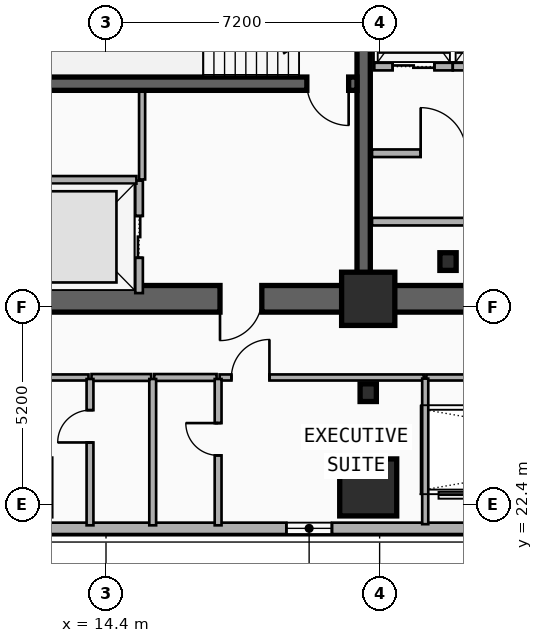
"""IFC4 building model, lengths in metres.
Left out: names, types, materials, properties, quantities, classifications, styles, units other than length and angle.
Written with IfcOpenShell. Run it as: python <this file> out.ifc"""

import sys

from ifc_helpers import new_model, si_unit, direction, frame, frame_2d, origin, origin_2d, place, context, subcontext, project, spatial, rectangle, i_section, extrude, element, fill, save


model = new_model("IFC4")
c1 = context("Model", 3, precision=1e-05, world=origin(), true_north=direction((0.0, 1.0)))
c2 = subcontext(c1, "Body", "Model", "MODEL_VIEW")
j1 = project(units=[si_unit("LENGTHUNIT", "METRE"), si_unit("PLANEANGLEUNIT", "RADIAN")], contexts=[c1])
p1 = place(None, origin())
s1 = spatial("IfcSite", under=j1, at=p1, CompositionType="ELEMENT")
p2 = place(p1, origin())
s2 = spatial("IfcBuilding", under=s1, at=p2, CompositionType="ELEMENT")
p3 = place(p2, frame((0.0, 0.0, 36.0)))
s3 = spatial("IfcBuildingStorey", under=s2, at=p3, CompositionType="ELEMENT", Elevation=36.0)
p4 = place(p3, frame((21.18, 27.82, 0.0), z_axis=(0.0, 0.0, 1.0), x_axis=(-1.0, 0.0, 0.0)))
e1 = element("IfcWall", 1, at=p4, inside=s3, PredefinedType="SHEAR", context=c2, shape_type="SweptSolid", body=[
    extrude(rectangle(XDim=9.03, YDim=0.7, at=frame_2d((4.515, 0.0))), origin(), (0.0, 0.0, 1.0), 3.5),
])
p5 = place(p4, frame((2.68, 0.0, 0.0)))
e2 = element("IfcOpeningElement", 2, at=p5, cuts=e1, PredefinedType="OPENING", context=c2, shape_type="SweptSolid", body=[
    extrude(rectangle(XDim=1.1, YDim=2.15, at=frame_2d((0.55, 1.075))), frame((0.0, 0.36, 0.0), z_axis=(0.0, -1.0, 0.0), x_axis=(1.0, 0.0, 0.0)), (0.0, 0.0, 1.0), 0.72),
])
p6 = place(p3, frame((33.15, 27.82, 0.0), z_axis=(0.0, 0.0, 1.0), x_axis=(-1.0, 0.0, 0.0)))
e3 = element("IfcWall", 3, at=p6, inside=s3, PredefinedType="SHEAR", context=c2, shape_type="SweptSolid", body=[
    extrude(rectangle(XDim=11.97, YDim=0.7, at=frame_2d((5.985, 0.0))), origin(), (0.0, 0.0, 1.0), 3.5),
])
p7 = place(p6, frame((6.1, 0.0, 0.0)))
e4 = element("IfcOpeningElement", 4, at=p7, cuts=e3, PredefinedType="OPENING", context=c2, shape_type="SweptSolid", body=[
    extrude(rectangle(XDim=1.6, YDim=2.2, at=frame_2d((0.8, 1.1))), frame((0.0, 0.36, 0.0), z_axis=(0.0, -1.0, 0.0), x_axis=(1.0, 0.0, 0.0)), (0.0, 0.0, 1.0), 0.72),
])
p8 = place(p3, frame((21.18, 28.17, 0.0), z_axis=(0.0, 0.0, 1.0), x_axis=(0.0, 1.0, 0.0)))
e5 = element("IfcWall", 5, at=p8, inside=s3, PredefinedType="SHEAR", context=c2, shape_type="SweptSolid", body=[
    extrude(rectangle(XDim=8.53, YDim=0.35, at=frame_2d((4.265, 0.0))), origin(), (0.0, 0.0, 1.0), 3.5),
])
p9 = place(p3, frame((21.005, 33.48, 0.0), z_axis=(0.0, 0.0, 1.0), x_axis=(-1.0, 0.0, 0.0)))
e6 = element("IfcWall", 6, at=p9, inside=s3, PredefinedType="SHEAR", context=c2, shape_type="SweptSolid", body=[
    extrude(rectangle(XDim=8.505, YDim=0.35, at=frame_2d((4.252, 0.0))), origin(), (0.0, 0.0, 1.0), 3.5),
])
p10 = place(p9, frame((0.22, 0.0, 0.0)))
e7 = element("IfcOpeningElement", 7, at=p10, cuts=e6, PredefinedType="OPENING", context=c2, shape_type="SweptSolid", body=[
    extrude(rectangle(XDim=1.1, YDim=2.15, at=frame_2d((0.55, 1.075))), frame((0.0, 0.185, 0.0), z_axis=(0.0, -1.0, 0.0), x_axis=(1.0, 0.0, 0.0)), (0.0, 0.0, 1.0), 0.37),
])
p11 = place(p3, frame((23.4, 28.8, 0.0), z_axis=(0.0, 0.0, 1.0), x_axis=(1.0, 0.0, 0.0)))
e8 = element("IfcColumn", 8, at=p11, inside=s3, PredefinedType="COLUMN", context=c2, shape_type="SweptSolid", body=[
    extrude(i_section(OverallWidth=0.428, OverallDepth=0.465, WebThickness=0.045, FlangeThickness=0.073, FilletRadius=0.015, at=origin_2d()), origin(), (0.0, 0.0, 1.0), 3.5),
])
p12 = place(p3, frame((21.3, 27.82, 0.0), z_axis=(0.0, 0.0, 1.0), x_axis=(1.0, 0.0, 0.0)))
e9 = element("IfcColumn", 9, at=p12, inside=s3, PredefinedType="COLUMN", context=c2, shape_type="SweptSolid", body=[
    extrude(rectangle(XDim=1.4, YDim=1.4, at=origin_2d()), origin(), (0.0, 0.0, 1.0), 3.5),
])
p13 = place(p3, frame((21.3, 25.35, 0.0), z_axis=(0.0, 0.0, 1.0), x_axis=(1.0, 0.0, 0.0)))
e10 = element("IfcColumn", 10, at=p13, inside=s3, PredefinedType="COLUMN", context=c2, shape_type="SweptSolid", body=[
    extrude(i_section(OverallWidth=0.428, OverallDepth=0.465, WebThickness=0.045, FlangeThickness=0.073, FilletRadius=0.015, at=origin_2d()), origin(), (0.0, 0.0, 1.0), 3.5),
])
p14 = place(p3, frame((21.3, 22.966, 0.0), z_axis=(0.0, -0.090310252801, 0.995913680114), x_axis=(1.0, 0.0, 0.0)))
e11 = element("IfcColumn", 11, at=p14, inside=s3, PredefinedType="COLUMN", context=c2, shape_type="SweptSolid", body=[
    extrude(rectangle(XDim=1.5, YDim=1.5, at=origin_2d()), origin(), (0.0, 0.0, 1.0), 3.514),
])
p15 = place(p3, frame((53.4, 21.78, 0.0), z_axis=(0.0, 0.0, 1.0), x_axis=(-1.0, 0.0, 0.0)))
e12 = element("IfcWall", 12, at=p15, inside=s3, PredefinedType="SOLIDWALL", context=c2, shape_type="SweptSolid", body=[
    extrude(rectangle(XDim=49.2, YDim=0.3, at=frame_2d((24.6, 0.0))), origin(), (0.0, 0.0, 1.0), 3.24),
])
p16 = place(p15, frame((46.915, 0.0, 0.65)))
e13 = element("IfcOpeningElement", 13, at=p16, cuts=e12, PredefinedType="OPENING", context=c2, shape_type="SweptSolid", body=[
    extrude(rectangle(XDim=1.8, YDim=1.8, at=frame_2d((0.9, 0.9))), frame((0.0, 0.16, 0.0), z_axis=(0.0, -1.0, 0.0), x_axis=(1.0, 0.0, 0.0)), (0.0, 0.0, 1.0), 0.32),
])
p17 = place(p15, frame((42.227, 0.0, 0.65)))
e14 = element("IfcOpeningElement", 14, at=p17, cuts=e12, PredefinedType="OPENING", context=c2, shape_type="SweptSolid", body=[
    extrude(rectangle(XDim=1.8, YDim=1.8, at=frame_2d((0.9, 0.9))), frame((0.0, 0.16, 0.0), z_axis=(0.0, -1.0, 0.0), x_axis=(1.0, 0.0, 0.0)), (0.0, 0.0, 1.0), 0.32),
])
p18 = place(p15, frame((33.055, 0.0, 0.48)))
e15 = element("IfcOpeningElement", 15, at=p18, cuts=e12, PredefinedType="OPENING", context=c2, shape_type="SweptSolid", body=[
    extrude(rectangle(XDim=1.2, YDim=1.5, at=frame_2d((0.6, 0.75))), frame((0.0, 0.16, 0.0), z_axis=(0.0, -1.0, 0.0), x_axis=(1.0, 0.0, 0.0)), (0.0, 0.0, 1.0), 0.32),
])
p19 = place(p15, frame((14.995, 0.0, 1.22)))
e16 = element("IfcOpeningElement", 16, at=p19, cuts=e12, PredefinedType="OPENING", context=c2, shape_type="SweptSolid", body=[
    extrude(rectangle(XDim=1.1, YDim=1.05, at=frame_2d((0.55, 0.525))), frame((0.0, 0.16, 0.0), z_axis=(0.0, -1.0, 0.0), x_axis=(1.0, 0.0, 0.0)), (0.0, 0.0, 1.0), 0.32),
])
p20 = place(p15, frame((5.173, 0.0, 0.65)))
e17 = element("IfcOpeningElement", 17, at=p20, cuts=e12, PredefinedType="OPENING", context=c2, shape_type="SweptSolid", body=[
    extrude(rectangle(XDim=1.8, YDim=1.8, at=frame_2d((0.9, 0.9))), frame((0.0, 0.16, 0.0), z_axis=(0.0, -1.0, 0.0), x_axis=(1.0, 0.0, 0.0)), (0.0, 0.0, 1.0), 0.32),
])
p21 = place(p15, frame((0.485, 0.0, 0.65)))
e18 = element("IfcOpeningElement", 18, at=p21, cuts=e12, PredefinedType="OPENING", context=c2, shape_type="SweptSolid", body=[
    extrude(rectangle(XDim=1.8, YDim=1.8, at=frame_2d((0.9, 0.9))), frame((0.0, 0.16, 0.0), z_axis=(0.0, -1.0, 0.0), x_axis=(1.0, 0.0, 0.0)), (0.0, 0.0, 1.0), 0.32),
])
p22 = place(p3, frame((15.27, 27.97, 0.0), z_axis=(0.0, 0.0, 1.0), x_axis=(0.0, 1.0, 0.0)))
e19 = element("IfcWall", 19, at=p22, inside=s3, PredefinedType="PARTITIONING", context=c2, shape_type="SweptSolid", body=[
    extrude(rectangle(XDim=2.96, YDim=0.2, at=frame_2d((1.48, 0.0))), origin(), (0.0, 0.0, 1.0), 2.212),
])
p23 = place(p22, frame((0.93, 0.0, 0.0)))
e20 = element("IfcOpeningElement", 20, at=p23, cuts=e19, PredefinedType="OPENING", context=c2, shape_type="SweptSolid", body=[
    extrude(rectangle(XDim=1.1, YDim=2.15, at=frame_2d((0.55, 1.075))), frame((0.0, 0.11, 0.0), z_axis=(0.0, -1.0, 0.0), x_axis=(1.0, 0.0, 0.0)), (0.0, 0.0, 1.0), 0.22),
])
p24 = place(p3, frame((12.45, 30.95, 0.0), z_axis=(0.0, 0.0, 1.0), x_axis=(1.0, 0.0, 0.0)))
e21 = element("IfcWall", 21, at=p24, inside=s3, PredefinedType="PARTITIONING", context=c2, shape_type="SweptSolid", body=[
    extrude(rectangle(XDim=2.75, YDim=0.2, at=frame_2d((1.375, 0.0))), origin(), (0.0, 0.0, 1.0), 2.212),
])
p25 = place(p3, frame((21.46, 33.93, 0.0), z_axis=(0.0, 0.0, 1.0), x_axis=(1.0, 0.0, 0.0)))
e22 = element("IfcWall", 22, at=p25, inside=s3, PredefinedType="PARTITIONING", context=c2, shape_type="SweptSolid", body=[
    extrude(rectangle(XDim=2.065, YDim=0.2, at=frame_2d((1.032, 0.0))), origin(), (0.0, 0.0, 1.0), 2.212),
])
p26 = place(p25, frame((0.482, 0.0, 0.0)))
e23 = element("IfcOpeningElement", 23, at=p26, cuts=e22, PredefinedType="OPENING", context=c2, shape_type="SweptSolid", body=[
    extrude(rectangle(XDim=1.1, YDim=2.15, at=frame_2d((0.55, 1.075))), frame((0.0, 0.11, 0.0), z_axis=(0.0, -1.0, 0.0), x_axis=(1.0, 0.0, 0.0)), (0.0, 0.0, 1.0), 0.22),
])
p27 = place(p3, frame((23.525, 33.93, 0.0), z_axis=(0.0, 0.0, 1.0), x_axis=(1.0, 0.0, 0.0)))
e24 = element("IfcWall", 24, at=p27, inside=s3, PredefinedType="PARTITIONING", context=c2, shape_type="SweptSolid", body=[
    extrude(rectangle(XDim=2.05, YDim=0.2, at=frame_2d((1.025, 0.0))), origin(), (0.0, 0.0, 1.0), 3.24),
])
p28 = place(p27, frame((0.475, 0.0, 0.0)))
e25 = element("IfcOpeningElement", 25, at=p28, cuts=e24, PredefinedType="OPENING", context=c2, shape_type="SweptSolid", body=[
    extrude(rectangle(XDim=1.1, YDim=2.15, at=frame_2d((0.55, 1.075))), frame((0.0, 0.11, 0.0), z_axis=(0.0, -1.0, 0.0), x_axis=(1.0, 0.0, 0.0)), (0.0, 0.0, 1.0), 0.22),
])
p29 = place(p3, frame((21.4, 31.65, 0.0), z_axis=(0.0, 0.0, 1.0), x_axis=(1.0, 0.0, 0.0)))
e26 = element("IfcWall", 26, at=p29, inside=s3, PredefinedType="PARTITIONING", context=c2, shape_type="SweptSolid", body=[
    extrude(rectangle(XDim=3.76, YDim=0.2, at=frame_2d((1.88, 0.0))), origin(), (0.0, 0.0, 1.0), 2.28),
])
p30 = place(p29, frame((1.28, 0.0, 0.0)))
e27 = element("IfcOpeningElement", 27, at=p30, cuts=e26, PredefinedType="OPENING", context=c2, shape_type="SweptSolid", body=[
    extrude(rectangle(XDim=1.2, YDim=2.15, at=frame_2d((0.6, 1.075))), frame((0.0, 0.11, 0.0), z_axis=(0.0, -1.0, 0.0), x_axis=(1.0, 0.0, 0.0)), (0.0, 0.0, 1.0), 0.22),
])
p31 = place(p3, frame((21.4, 29.85, 0.0), z_axis=(0.0, 0.0, 1.0), x_axis=(1.0, 0.0, 0.0)))
e28 = element("IfcWall", 28, at=p31, inside=s3, PredefinedType="PARTITIONING", context=c2, shape_type="SweptSolid", body=[
    extrude(rectangle(XDim=3.76, YDim=0.2, at=frame_2d((1.88, 0.0))), origin(), (0.0, 0.0, 1.0), 2.28),
])
p32 = place(p3, frame((9.04, 25.75, 0.0), z_axis=(0.0, 0.0, 1.0), x_axis=(1.0, 0.0, 0.0)))
e29 = element("IfcWall", 29, at=p32, inside=s3, PredefinedType="PARTITIONING", context=c2, shape_type="SweptSolid", body=[
    extrude(rectangle(XDim=4.899, YDim=0.16, at=frame_2d((2.449, 0.0))), origin(), (0.0, 0.0, 1.0), 2.28),
])
p33 = place(p32, frame((0.291, 0.0, 0.0)))
e30 = element("IfcOpeningElement", 30, at=p33, cuts=e29, PredefinedType="OPENING", context=c2, shape_type="SweptSolid", body=[
    extrude(rectangle(XDim=1.0, YDim=2.15, at=frame_2d((0.5, 1.075))), frame((0.0, 0.09, 0.0), z_axis=(0.0, -1.0, 0.0), x_axis=(1.0, 0.0, 0.0)), (0.0, 0.0, 1.0), 0.18),
])
p34 = place(p3, frame((14.019, 25.75, 0.0), z_axis=(0.0, 0.0, 1.0), x_axis=(1.0, 0.0, 0.0)))
e31 = element("IfcWall", 31, at=p34, inside=s3, PredefinedType="PLUMBINGWALL", context=c2, shape_type="SweptSolid", body=[
    extrude(rectangle(XDim=1.57, YDim=0.18, at=frame_2d((0.785, 0.0))), origin(), (0.0, 0.0, 1.0), 3.24),
])
p35 = place(p3, frame((17.39, 25.75, 0.0), z_axis=(0.0, 0.0, 1.0), x_axis=(1.0, 0.0, 0.0)))
e32 = element("IfcWall", 32, at=p35, inside=s3, PredefinedType="PARTITIONING", context=c2, shape_type="SweptSolid", body=[
    extrude(rectangle(XDim=5.37, YDim=0.16, at=frame_2d((2.685, 0.0))), origin(), (0.0, 0.0, 1.0), 2.28),
])
p36 = place(p35, frame((0.31, 0.0, 0.0)))
e33 = element("IfcOpeningElement", 33, at=p36, cuts=e32, PredefinedType="OPENING", context=c2, shape_type="SweptSolid", body=[
    extrude(rectangle(XDim=1.0, YDim=2.15, at=frame_2d((0.5, 1.075))), frame((0.0, 0.09, 0.0), z_axis=(0.0, -1.0, 0.0), x_axis=(1.0, 0.0, 0.0)), (0.0, 0.0, 1.0), 0.18),
])
p37 = place(p3, frame((15.669, 25.75, 0.0), z_axis=(0.0, 0.0, 1.0), x_axis=(1.0, 0.0, 0.0)))
e34 = element("IfcWall", 34, at=p37, inside=s3, PredefinedType="PLUMBINGWALL", context=c2, shape_type="SweptSolid", body=[
    extrude(rectangle(XDim=1.641, YDim=0.18, at=frame_2d((0.821, 0.0))), origin(), (0.0, 0.0, 1.0), 3.24),
])
p38 = place(p3, frame((13.979, 21.86, 0.0), z_axis=(0.0, 0.0, 1.0), x_axis=(0.0, 1.0, 0.0)))
e35 = element("IfcWall", 35, at=p38, inside=s3, PredefinedType="PLUMBINGWALL", context=c2, shape_type="SweptSolid", body=[
    extrude(rectangle(XDim=3.85, YDim=0.18, at=frame_2d((1.925, 0.0))), origin(), (0.0, 0.0, 1.0), 2.82),
])
p39 = place(p38, frame((2.18, 0.0, 0.0)))
e36 = element("IfcOpeningElement", 36, at=p39, cuts=e35, PredefinedType="OPENING", context=c2, shape_type="SweptSolid", body=[
    extrude(rectangle(XDim=0.85, YDim=2.1, at=frame_2d((0.425, 1.05))), frame((0.0, 0.1, 0.0), z_axis=(0.0, -1.0, 0.0), x_axis=(1.0, 0.0, 0.0)), (0.0, 0.0, 1.0), 0.2),
])
p40 = place(p3, frame((15.629, 21.86, 0.0), z_axis=(0.0, 0.0, 1.0), x_axis=(0.0, 1.0, 0.0)))
e37 = element("IfcWall", 37, at=p40, inside=s3, PredefinedType="PLUMBINGWALL", context=c2, shape_type="SweptSolid", body=[
    extrude(rectangle(XDim=3.85, YDim=0.18, at=frame_2d((1.925, 0.0))), origin(), (0.0, 0.0, 1.0), 2.82),
])
p41 = place(p3, frame((17.35, 21.86, 0.0), z_axis=(0.0, 0.0, 1.0), x_axis=(0.0, 1.0, 0.0)))
e38 = element("IfcWall", 38, at=p41, inside=s3, PredefinedType="PLUMBINGWALL", context=c2, shape_type="SweptSolid", body=[
    extrude(rectangle(XDim=3.85, YDim=0.18, at=frame_2d((1.925, 0.0))), origin(), (0.0, 0.0, 1.0), 2.82),
])
p42 = place(p41, frame((1.84, 0.0, 0.0)))
e39 = element("IfcOpeningElement", 39, at=p42, cuts=e38, PredefinedType="OPENING", context=c2, shape_type="SweptSolid", body=[
    extrude(rectangle(XDim=0.85, YDim=2.1, at=frame_2d((0.425, 1.05))), frame((0.0, 0.1, 0.0), z_axis=(0.0, -1.0, 0.0), x_axis=(1.0, 0.0, 0.0)), (0.0, 0.0, 1.0), 0.2),
])
p43 = place(p3, frame((15.35, 30.96, 0.0), z_axis=(0.0, 0.0, 1.0), x_axis=(0.0, 1.0, 0.0)))
e40 = element("IfcWall", 40, at=p43, inside=s3, PredefinedType="PARTITIONING", context=c2, shape_type="SweptSolid", body=[
    extrude(rectangle(XDim=2.31, YDim=0.16, at=frame_2d((1.155, 0.0))), origin(), (0.0, 0.0, 1.0), 3.24),
])
p44 = place(p3, frame((22.83, 25.75, 0.0), z_axis=(0.0, 0.0, 1.0), x_axis=(1.0, 0.0, 0.0)))
e41 = element("IfcWall", 41, at=p44, inside=s3, PredefinedType="PARTITIONING", context=c2, shape_type="SweptSolid", body=[
    extrude(rectangle(XDim=11.94, YDim=0.16, at=frame_2d((5.97, 0.0))), origin(), (0.0, 0.0, 1.0), 3.24),
])
p45 = place(p3, frame((22.8, 21.89, 0.0), z_axis=(0.0, 0.0, 1.0), x_axis=(0.0, 1.0, 0.0)))
e42 = element("IfcWall", 42, at=p45, inside=s3, PredefinedType="PARTITIONING", context=c2, shape_type="SweptSolid", body=[
    extrude(rectangle(XDim=3.83, YDim=0.16, at=frame_2d((1.915, 0.0))), origin(), (0.0, 0.0, 1.0), 2.82),
])
p46 = place(p18, origin())
e43 = element("IfcWindow", 43, at=p46, inside=s3, PartitioningType="SINGLE_PANEL", PredefinedType="WINDOW", context=c2, shape_type="SweptSolid", body=[
    extrude(rectangle(XDim=1.2, YDim=1.5, at=frame_2d((0.6, 0.75))), frame((0.0, 0.03, 0.0), z_axis=(0.0, -1.0, 0.0), x_axis=(1.0, 0.0, 0.0)), (0.0, 0.0, 1.0), 0.06),
])
fill(e15, e43)
p47 = place(p23, origin())
e44 = element("IfcDoor", 44, at=p47, inside=s3, OperationType="DOUBLE_DOOR_SLIDING", PredefinedType="DOOR", context=c2, shape_type="SweptSolid", body=[
    extrude(rectangle(XDim=1.1, YDim=2.15, at=frame_2d((0.55, 1.075))), frame((0.0, 0.025, 0.0), z_axis=(0.0, -1.0, 0.0), x_axis=(1.0, 0.0, 0.0)), (0.0, 0.0, 1.0), 0.05),
])
fill(e20, e44)
p48 = place(p26, origin())
e45 = element("IfcDoor", 45, at=p48, inside=s3, OperationType="DOUBLE_DOOR_SLIDING", PredefinedType="DOOR", context=c2, shape_type="SweptSolid", body=[
    extrude(rectangle(XDim=1.1, YDim=2.15, at=frame_2d((0.55, 1.075))), frame((0.0, 0.025, 0.0), z_axis=(0.0, -1.0, 0.0), x_axis=(1.0, 0.0, 0.0)), (0.0, 0.0, 1.0), 0.05),
])
fill(e23, e45)
p49 = place(p10, origin())
e46 = element("IfcDoor", 46, at=p49, inside=s3, OperationType="SINGLE_SWING_LEFT", PredefinedType="DOOR", context=c2, shape_type="SweptSolid", body=[
    extrude(rectangle(XDim=1.1, YDim=2.15, at=frame_2d((0.55, 1.075))), frame((0.0, 0.025, 0.0), z_axis=(0.0, -1.0, 0.0), x_axis=(1.0, 0.0, 0.0)), (0.0, 0.0, 1.0), 0.05),
])
fill(e7, e46)
p50 = place(p5, origin())
e47 = element("IfcDoor", 47, at=p50, inside=s3, OperationType="SINGLE_SWING_RIGHT", PredefinedType="DOOR", context=c2, shape_type="SweptSolid", body=[
    extrude(rectangle(XDim=1.1, YDim=2.15, at=frame_2d((0.55, 1.075))), frame((0.0, 0.025, 0.0), z_axis=(0.0, -1.0, 0.0), x_axis=(1.0, 0.0, 0.0)), (0.0, 0.0, 1.0), 0.05),
])
fill(e2, e47)
p51 = place(p30, origin())
e48 = element("IfcDoor", 48, at=p51, inside=s3, OperationType="SINGLE_SWING_LEFT", PredefinedType="DOOR", context=c2, shape_type="SweptSolid", body=[
    extrude(rectangle(XDim=1.2, YDim=2.15, at=frame_2d((0.6, 1.075))), frame((0.0, 0.025, 0.0), z_axis=(0.0, -1.0, 0.0), x_axis=(1.0, 0.0, 0.0)), (0.0, 0.0, 1.0), 0.05),
])
fill(e27, e48)
p52 = place(p36, origin())
e49 = element("IfcDoor", 49, at=p52, inside=s3, OperationType="SINGLE_SWING_RIGHT", PredefinedType="DOOR", context=c2, shape_type="SweptSolid", body=[
    extrude(rectangle(XDim=1.0, YDim=2.15, at=frame_2d((0.5, 1.075))), frame((0.0, 0.025, 0.0), z_axis=(0.0, -1.0, 0.0), x_axis=(1.0, 0.0, 0.0)), (0.0, 0.0, 1.0), 0.05),
])
fill(e33, e49)
p53 = place(p39, origin())
e50 = element("IfcDoor", 50, at=p53, inside=s3, OperationType="SINGLE_SWING_LEFT", PredefinedType="DOOR", context=c2, shape_type="SweptSolid", body=[
    extrude(rectangle(XDim=0.85, YDim=2.1, at=frame_2d((0.425, 1.05))), frame((0.0, 0.025, 0.0), z_axis=(0.0, -1.0, 0.0), x_axis=(1.0, 0.0, 0.0)), (0.0, 0.0, 1.0), 0.05),
])
fill(e36, e50)
p54 = place(p42, origin())
e51 = element("IfcDoor", 51, at=p54, inside=s3, OperationType="SINGLE_SWING_RIGHT", PredefinedType="DOOR", context=c2, shape_type="SweptSolid", body=[
    extrude(rectangle(XDim=0.85, YDim=2.1, at=frame_2d((0.425, 1.05))), frame((0.0, 0.025, 0.0), z_axis=(0.0, -1.0, 0.0), x_axis=(1.0, 0.0, 0.0)), (0.0, 0.0, 1.0), 0.05),
])
fill(e39, e51)
save(model, sys.argv[1])
